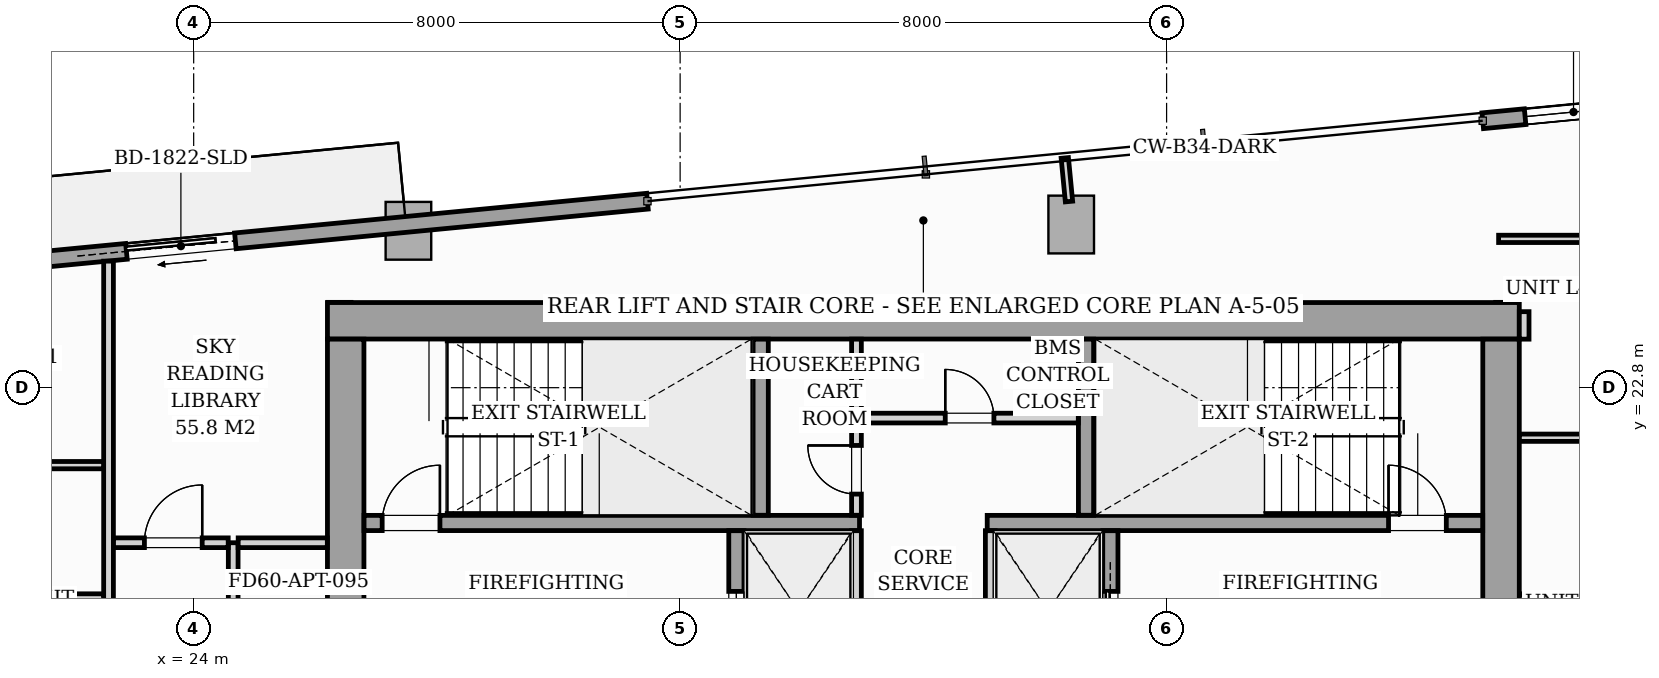
"""IFC4 building model, lengths in metres.
Left out: names, types, materials, properties, quantities, classifications, styles, units other than length and angle.
Written with IfcOpenShell. Run it as: python <this file> out.ifc"""

import sys

from ifc_helpers import new_model, si_unit, direction, frame, frame_2d, origin, origin_2d, place, context, subcontext, project, spatial, rectangle, i_section, extrude, source, transform, mapped, element, fill, save


model = new_model("IFC4")
c1 = context("Model", 3, precision=1e-05, world=origin(), true_north=direction((0.0, 1.0)))
c2 = subcontext(c1, "Body", "Model", "MODEL_VIEW")
j1 = project(units=[si_unit("LENGTHUNIT", "METRE"), si_unit("PLANEANGLEUNIT", "RADIAN")], contexts=[c1])
p1 = place(None, origin())
s1 = spatial("IfcSite", under=j1, at=p1, CompositionType="ELEMENT")
p2 = place(p1, origin())
s2 = spatial("IfcBuilding", under=s1, at=p2, CompositionType="ELEMENT")
p3 = place(p2, frame((0.0, 0.0, 173.0)))
s3 = spatial("IfcBuildingStorey", under=s2, at=p3, CompositionType="ELEMENT", Elevation=173.0)
m1 = source(origin(), c2, "Body", "SweptSolid", [
    extrude(i_section(OverallWidth=0.416, OverallDepth=0.446, WebThickness=0.039, FlangeThickness=0.063, FilletRadius=0.018, at=origin_2d()), origin(), (0.0, 0.0, 1.0), 3.196),
])
for number, where, z_axis, x_axis in (
    (1, (26.4, 24.0, 0.002), (0.0, 0.0, 1.0), (1.0, 0.0, 0.0)),
    (2, (33.12, 24.0, 0.002), (0.0, 0.0, 1.0), (1.0, 0.0, 0.0)),
    (3, (38.88, 24.0, 0.002), (0.0, 0.0, 1.0), (1.0, 0.0, 0.0)),
    (4, (45.6, 24.0, 0.002), (0.0, 0.0, 1.0), (1.0, 0.0, 0.0)),
):
    element("IfcColumn", number, at=place(p3, frame(where, z_axis=z_axis, x_axis=x_axis)), inside=s3, PredefinedType="PILASTER", context=c2, shape_type="MappedRepresentation", body=[
        mapped(m1, transform((0.0, 0.0, 0.0), scale=1.0)),
    ])
m2 = source(origin(), c2, "Body", "SweptSolid", [
    extrude(rectangle(XDim=0.75, YDim=0.95, at=origin_2d()), origin(), (0.0, 0.0, 1.0), 3.196),
])
for number, where, z_axis, x_axis in (
    (5, (27.532, 25.38, 0.002), (0.0, 0.0, 1.0), (0.995, 0.096, 0.0)),
    (6, (38.431, 25.483, 0.002), (0.0, 0.0, 1.0), (0.995, 0.096, 0.0)),
):
    element("IfcColumn", number, at=place(p3, frame(where, z_axis=z_axis, x_axis=x_axis)), inside=s3, PredefinedType="COLUMN", context=c2, shape_type="MappedRepresentation", body=[
        mapped(m2, transform((0.0, 0.0, 0.0), scale=1.0)),
    ])
p4 = place(p3, frame((15.437, 24.324, 0.0), z_axis=(0.0, 0.0, 1.0), x_axis=(0.995395627913, 0.095851676732, 0.0)))
e7 = element("IfcWall", 7, at=p4, inside=s3, PredefinedType="STANDARD", context=c2, shape_type="SweptSolid", body=[
    extrude(rectangle(XDim=16.1, YDim=0.26, at=frame_2d((8.05, 0.0))), origin(), (0.0, 0.0, 1.0), 2.94),
])
p5 = place(p4, frame((7.492, 0.0, 0.0)))
e8 = element("IfcOpeningElement", 8, at=p5, cuts=e7, PredefinedType="OPENING", context=c2, shape_type="SweptSolid", body=[
    extrude(rectangle(XDim=1.8, YDim=2.06, at=frame_2d((0.9, 1.03))), frame((0.0, 0.14, 0.0), z_axis=(0.0, -1.0, 0.0), x_axis=(1.0, 0.0, 0.0)), (0.0, 0.0, 1.0), 0.28),
])
p6 = place(p4, frame((2.05, 0.0, 0.65)))
e9 = element("IfcOpeningElement", 9, at=p6, cuts=e7, PredefinedType="OPENING", context=c2, shape_type="SweptSolid", body=[
    extrude(rectangle(XDim=1.6, YDim=1.5, at=frame_2d((0.8, 0.75))), frame((0.0, 0.14, 0.0), z_axis=(0.0, -1.0, 0.0), x_axis=(1.0, 0.0, 0.0)), (0.0, 0.0, 1.0), 0.28),
])
p7 = place(p3, frame((45.199, 27.19, 0.0), z_axis=(0.0, 0.0, 1.0), x_axis=(0.995397074604, 0.095836652014, 0.0)))
e10 = element("IfcWall", 10, at=p7, inside=s3, PredefinedType="STANDARD", context=c2, shape_type="SweptSolid", body=[
    extrude(rectangle(XDim=16.1, YDim=0.26, at=frame_2d((8.05, 0.0))), origin(), (0.0, 0.0, 1.0), 2.94),
])
p8 = place(p7, frame((10.2, 0.0, 0.0)))
e11 = element("IfcOpeningElement", 11, at=p8, cuts=e10, PredefinedType="OPENING", context=c2, shape_type="SweptSolid", body=[
    extrude(rectangle(XDim=1.8, YDim=2.06, at=frame_2d((0.9, 1.03))), frame((0.0, 0.14, 0.0), z_axis=(0.0, -1.0, 0.0), x_axis=(1.0, 0.0, 0.0)), (0.0, 0.0, 1.0), 0.28),
])
p9 = place(p7, frame((0.7, 0.0, 0.65)))
e12 = element("IfcOpeningElement", 12, at=p9, cuts=e10, PredefinedType="OPENING", context=c2, shape_type="SweptSolid", body=[
    extrude(rectangle(XDim=1.6, YDim=1.5, at=frame_2d((0.8, 0.75))), frame((0.0, 0.14, 0.0), z_axis=(0.0, -1.0, 0.0), x_axis=(1.0, 0.0, 0.0)), (0.0, 0.0, 1.0), 0.28),
])
p10 = place(p3, frame((26.2, 23.9, 0.0), z_axis=(0.0, 0.0, 1.0), x_axis=(1.0, 0.0, 0.0)))
e13 = element("IfcWall", 13, at=p10, inside=s3, PredefinedType="SHEAR", context=c2, shape_type="SweptSolid", body=[
    extrude(rectangle(XDim=19.6, YDim=0.6, at=frame_2d((9.8, 0.0))), origin(), (0.0, 0.0, 1.0), 3.2),
])
for number, where, z_axis, x_axis in (
    (14, (26.5, 17.802, 0.0), (0.0, 0.0, 1.0), (0.0, 1.0, 0.0)),
    (15, (45.5, 17.802, 0.0), (0.0, 0.0, 1.0), (0.0, 1.0, 0.0)),
):
    element("IfcWall", number, at=place(p3, frame(where, z_axis=z_axis, x_axis=x_axis)), inside=s3, PredefinedType="SHEAR", context=c2, shape_type="SweptSolid", body=[
        extrude(rectangle(XDim=5.796, YDim=0.6, at=frame_2d((2.898, 0.0))), origin(), (0.0, 0.0, 1.0), 3.2),
    ])
p11 = place(p3, frame((26.802, 20.575, 0.0), z_axis=(0.0, 0.0, 1.0), x_axis=(1.0, 0.0, 0.0)))
e16 = element("IfcWall", 16, at=p11, inside=s3, PredefinedType="SOLIDWALL", context=c2, shape_type="SweptSolid", body=[
    extrude(rectangle(XDim=8.148, YDim=0.25, at=frame_2d((4.074, 0.0))), origin(), (0.0, 0.0, 1.0), 3.2),
])
p12 = place(p11, frame((0.298, 0.0, 0.0)))
e17 = element("IfcOpeningElement", 17, at=p12, cuts=e16, PredefinedType="OPENING", context=c2, shape_type="SweptSolid", body=[
    extrude(rectangle(XDim=0.95, YDim=2.06, at=frame_2d((0.475, 1.03))), frame((0.0, 0.135, 0.0), z_axis=(0.0, -1.0, 0.0), x_axis=(1.0, 0.0, 0.0)), (0.0, 0.0, 1.0), 0.27),
])
p13 = place(p3, frame((37.05, 20.575, 0.0), z_axis=(0.0, 0.0, 1.0), x_axis=(1.0, 0.0, 0.0)))
e18 = element("IfcWall", 18, at=p13, inside=s3, PredefinedType="SOLIDWALL", context=c2, shape_type="SweptSolid", body=[
    extrude(rectangle(XDim=8.148, YDim=0.25, at=frame_2d((4.074, 0.0))), origin(), (0.0, 0.0, 1.0), 3.2),
])
p14 = place(p13, frame((6.6, 0.0, 0.0)))
e19 = element("IfcOpeningElement", 19, at=p14, cuts=e18, PredefinedType="OPENING", context=c2, shape_type="SweptSolid", body=[
    extrude(rectangle(XDim=0.95, YDim=2.06, at=frame_2d((0.475, 1.03))), frame((0.0, 0.135, 0.0), z_axis=(0.0, -1.0, 0.0), x_axis=(1.0, 0.0, 0.0)), (0.0, 0.0, 1.0), 0.27),
])
for number, where, z_axis, x_axis in (
    (20, (33.325, 20.702, 0.0), (0.0, 0.0, 1.0), (0.0, 1.0, 0.0)),
    (21, (38.675, 20.702, 0.0), (0.0, 0.0, 1.0), (0.0, 1.0, 0.0)),
):
    element("IfcWall", number, at=place(p3, frame(where, z_axis=z_axis, x_axis=x_axis)), inside=s3, PredefinedType="SOLIDWALL", context=c2, shape_type="SweptSolid", body=[
        extrude(rectangle(XDim=2.896, YDim=0.25, at=frame_2d((1.448, 0.0))), origin(), (0.0, 0.0, 1.0), 3.2),
    ])
p15 = place(p3, frame((32.925, 17.802, 0.0), z_axis=(0.0, 0.0, 1.0), x_axis=(0.0, 1.0, 0.0)))
e22 = element("IfcWall", 22, at=p15, inside=s3, PredefinedType="SOLIDWALL", context=c2, shape_type="SweptSolid", body=[
    extrude(rectangle(XDim=2.646, YDim=0.25, at=frame_2d((1.323, 0.0))), origin(), (0.0, 0.0, 1.0), 3.2),
])
p16 = place(p15, frame((0.548, 0.0, 0.0)))
e23 = element("IfcOpeningElement", 23, at=p16, cuts=e22, PredefinedType="OPENING", context=c2, shape_type="SweptSolid", body=[
    extrude(rectangle(XDim=1.1, YDim=2.08, at=frame_2d((0.55, 1.04))), frame((0.0, 0.135, 0.0), z_axis=(0.0, -1.0, 0.0), x_axis=(1.0, 0.0, 0.0)), (0.0, 0.0, 1.0), 0.27),
])
for number, where, z_axis, x_axis in (
    (24, (34.9, 17.802, 0.0), (0.0, 0.0, 1.0), (0.0, 1.0, 0.0)),
    (25, (37.1, 17.802, 0.0), (0.0, 0.0, 1.0), (0.0, 1.0, 0.0)),
):
    element("IfcWall", number, at=place(p3, frame(where, z_axis=z_axis, x_axis=x_axis)), inside=s3, PredefinedType="PARTITIONING", context=c2, shape_type="SweptSolid", body=[
        extrude(rectangle(XDim=2.646, YDim=0.16, at=frame_2d((1.323, 0.0))), origin(), (0.0, 0.0, 1.0), 2.94),
    ])
p17 = place(p3, frame((39.075, 17.802, 0.0), z_axis=(0.0, 0.0, 1.0), x_axis=(0.0, 1.0, 0.0)))
e26 = element("IfcWall", 26, at=p17, inside=s3, PredefinedType="SOLIDWALL", context=c2, shape_type="SweptSolid", body=[
    extrude(rectangle(XDim=2.646, YDim=0.25, at=frame_2d((1.323, 0.0))), origin(), (0.0, 0.0, 1.0), 3.2),
])
p18 = place(p17, frame((0.548, 0.0, 0.0)))
e27 = element("IfcOpeningElement", 27, at=p18, cuts=e26, PredefinedType="OPENING", context=c2, shape_type="SweptSolid", body=[
    extrude(rectangle(XDim=1.1, YDim=2.08, at=frame_2d((0.55, 1.04))), frame((0.0, 0.135, 0.0), z_axis=(0.0, -1.0, 0.0), x_axis=(1.0, 0.0, 0.0)), (0.0, 0.0, 1.0), 0.27),
])
p19 = place(p3, frame((34.9, 20.702, 0.0), z_axis=(0.0, 0.0, 1.0), x_axis=(0.0, 1.0, 0.0)))
e28 = element("IfcWall", 28, at=p19, inside=s3, PredefinedType="PARTITIONING", context=c2, shape_type="SweptSolid", body=[
    extrude(rectangle(XDim=2.896, YDim=0.16, at=frame_2d((1.448, 0.0))), origin(), (0.0, 0.0, 1.0), 2.94),
])
p20 = place(p19, frame((0.348, 0.0, 0.0)))
e29 = element("IfcOpeningElement", 29, at=p20, cuts=e28, PredefinedType="OPENING", context=c2, shape_type="SweptSolid", body=[
    extrude(rectangle(XDim=0.8, YDim=2.05, at=frame_2d((0.4, 1.025))), frame((0.0, 0.09, 0.0), z_axis=(0.0, -1.0, 0.0), x_axis=(1.0, 0.0, 0.0)), (0.0, 0.0, 1.0), 0.18),
])
p21 = place(p3, frame((34.982, 22.3, 0.0), z_axis=(0.0, 0.0, 1.0), x_axis=(1.0, 0.0, 0.0)))
e30 = element("IfcWall", 30, at=p21, inside=s3, PredefinedType="PARTITIONING", context=c2, shape_type="SweptSolid", body=[
    extrude(rectangle(XDim=3.566, YDim=0.16, at=frame_2d((1.783, 0.0))), origin(), (0.0, 0.0, 1.0), 2.94),
])
p22 = place(p21, frame((1.378, 0.0, 0.0)))
e31 = element("IfcOpeningElement", 31, at=p22, cuts=e30, PredefinedType="OPENING", context=c2, shape_type="SweptSolid", body=[
    extrude(rectangle(XDim=0.8, YDim=2.05, at=frame_2d((0.4, 1.025))), frame((0.0, 0.09, 0.0), z_axis=(0.0, -1.0, 0.0), x_axis=(1.0, 0.0, 0.0)), (0.0, 0.0, 1.0), 0.18),
])
p23 = place(p3, frame((22.6, 13.232, 0.0), z_axis=(0.0, 0.0, 1.0), x_axis=(0.0, 1.0, 0.0)))
e32 = element("IfcWall", 32, at=p23, inside=s3, PredefinedType="PARTITIONING", context=c2, shape_type="SweptSolid", body=[
    extrude(rectangle(XDim=11.649, YDim=0.16, at=frame_2d((5.824, 0.0))), origin(), (0.0, 0.0, 1.0), 2.94),
])
p24 = place(p23, frame((0.493, 0.0, 0.0)))
e33 = element("IfcOpeningElement", 33, at=p24, cuts=e32, PredefinedType="OPENING", context=c2, shape_type="SweptSolid", body=[
    extrude(rectangle(XDim=0.95, YDim=2.06, at=frame_2d((0.475, 1.03))), frame((0.0, 0.09, 0.0), z_axis=(0.0, -1.0, 0.0), x_axis=(1.0, 0.0, 0.0)), (0.0, 0.0, 1.0), 0.18),
])
p25 = place(p3, frame((45.88, 23.598, 0.0), z_axis=(0.0, 0.0, 1.0), x_axis=(0.0, 1.0, 0.0)))
e34 = element("IfcWall", 34, at=p25, inside=s3, PredefinedType="PARTITIONING", context=c2, shape_type="SweptSolid", body=[
    extrude(rectangle(XDim=0.452, YDim=0.16, at=frame_2d((0.226, 0.0))), origin(), (0.0, 0.0, 1.0), 2.94),
])
p26 = place(p3, frame((20.262, 19.35, 0.0), z_axis=(0.0, 0.0, 1.0), x_axis=(1.0, 0.0, 0.0)))
e35 = element("IfcWall", 35, at=p26, inside=s3, PredefinedType="PARTITIONING", context=c2, shape_type="SweptSolid", body=[
    extrude(rectangle(XDim=2.256, YDim=0.12, at=frame_2d((1.128, 0.0))), origin(), (0.0, 0.0, 1.0), 2.94),
])
p27 = place(p3, frame((14.53, 21.526, 0.0), z_axis=(0.0, 0.0, 1.0), x_axis=(1.0, 0.0, 0.0)))
e36 = element("IfcWall", 36, at=p27, inside=s3, PredefinedType="PARTITIONING", context=c2, shape_type="SweptSolid", body=[
    extrude(rectangle(XDim=7.988, YDim=0.12, at=frame_2d((3.994, 0.0))), origin(), (0.0, 0.0, 1.0), 2.94),
])
p28 = place(p27, frame((2.925, 0.0, 0.0)))
e37 = element("IfcOpeningElement", 37, at=p28, cuts=e36, PredefinedType="OPENING", context=c2, shape_type="SweptSolid", body=[
    extrude(rectangle(XDim=0.85, YDim=2.05, at=frame_2d((0.425, 1.025))), frame((0.0, 0.07, 0.0), z_axis=(0.0, -1.0, 0.0), x_axis=(1.0, 0.0, 0.0)), (0.0, 0.0, 1.0), 0.14),
])
p29 = place(p3, frame((45.802, 19.35, 0.0), z_axis=(0.0, 0.0, 1.0), x_axis=(1.0, 0.0, 0.0)))
e38 = element("IfcWall", 38, at=p29, inside=s3, PredefinedType="PARTITIONING", context=c2, shape_type="SweptSolid", body=[
    extrude(rectangle(XDim=2.416, YDim=0.12, at=frame_2d((1.208, 0.0))), origin(), (0.0, 0.0, 1.0), 2.94),
])
p30 = place(p3, frame((45.46, 25.247, 0.0), z_axis=(0.0, 0.0, 1.0), x_axis=(1.0, 0.0, 0.0)))
e39 = element("IfcWall", 39, at=p30, inside=s3, PredefinedType="PARTITIONING", context=c2, shape_type="SweptSolid", body=[
    extrude(rectangle(XDim=9.461, YDim=0.12, at=frame_2d((4.73, 0.0))), origin(), (0.0, 0.0, 1.0), 2.94),
])
p31 = place(p30, frame((4.826, 0.0, 0.0)))
e40 = element("IfcOpeningElement", 40, at=p31, cuts=e39, PredefinedType="OPENING", context=c2, shape_type="SweptSolid", body=[
    extrude(rectangle(XDim=0.85, YDim=2.05, at=frame_2d((0.425, 1.025))), frame((0.0, 0.07, 0.0), z_axis=(0.0, -1.0, 0.0), x_axis=(1.0, 0.0, 0.0)), (0.0, 0.0, 1.0), 0.14),
])
p32 = place(p3, frame((45.802, 21.977, 0.0), z_axis=(0.0, 0.0, 1.0), x_axis=(1.0, 0.0, 0.0)))
e41 = element("IfcWall", 41, at=p32, inside=s3, PredefinedType="PARTITIONING", context=c2, shape_type="SweptSolid", body=[
    extrude(rectangle(XDim=18.504, YDim=0.12, at=frame_2d((9.252, 0.0))), origin(), (0.0, 0.0, 1.0), 2.94),
])
p33 = place(p32, frame((8.913, 0.0, 0.0)))
e42 = element("IfcOpeningElement", 42, at=p33, cuts=e41, PredefinedType="OPENING", context=c2, shape_type="SweptSolid", body=[
    extrude(rectangle(XDim=0.85, YDim=2.05, at=frame_2d((0.425, 1.025))), frame((0.0, 0.07, 0.0), z_axis=(0.0, -1.0, 0.0), x_axis=(1.0, 0.0, 0.0)), (0.0, 0.0, 1.0), 0.14),
])
p34 = place(p3, frame((24.65, 14.66, 0.0), z_axis=(0.0, 0.0, 1.0), x_axis=(0.0, 1.0, 0.0)))
e43 = element("IfcWall", 43, at=p34, inside=s3, PredefinedType="PARTITIONING", context=c2, shape_type="SweptSolid", body=[
    extrude(rectangle(XDim=5.59, YDim=0.16, at=frame_2d((2.795, 0.0))), origin(), (0.0, 0.0, 1.0), 2.94),
])
p35 = place(p34, frame((3.54, 0.0, 0.0)))
e44 = element("IfcOpeningElement", 44, at=p35, cuts=e43, PredefinedType="OPENING", context=c2, shape_type="SweptSolid", body=[
    extrude(rectangle(XDim=0.95, YDim=2.06, at=frame_2d((0.475, 1.03))), frame((0.0, 0.09, 0.0), z_axis=(0.0, -1.0, 0.0), x_axis=(1.0, 0.0, 0.0)), (0.0, 0.0, 1.0), 0.18),
])
p36 = place(p3, frame((22.682, 20.25, 0.0), z_axis=(0.0, 0.0, 1.0), x_axis=(1.0, 0.0, 0.0)))
e45 = element("IfcWall", 45, at=p36, inside=s3, PredefinedType="PARTITIONING", context=c2, shape_type="SweptSolid", body=[
    extrude(rectangle(XDim=1.886, YDim=0.16, at=frame_2d((0.943, 0.0))), origin(), (0.0, 0.0, 1.0), 2.94),
])
p37 = place(p36, frame((0.508, 0.0, 0.0)))
e46 = element("IfcOpeningElement", 46, at=p37, cuts=e45, PredefinedType="OPENING", context=c2, shape_type="SweptSolid", body=[
    extrude(rectangle(XDim=0.95, YDim=2.06, at=frame_2d((0.475, 1.03))), frame((0.0, 0.09, 0.0), z_axis=(0.0, -1.0, 0.0), x_axis=(1.0, 0.0, 0.0)), (0.0, 0.0, 1.0), 0.18),
])
p38 = place(p3, frame((24.732, 20.25, 0.0), z_axis=(0.0, 0.0, 1.0), x_axis=(1.0, 0.0, 0.0)))
e47 = element("IfcWall", 47, at=p38, inside=s3, PredefinedType="PARTITIONING", context=c2, shape_type="SweptSolid", body=[
    extrude(rectangle(XDim=1.466, YDim=0.16, at=frame_2d((0.733, 0.0))), origin(), (0.0, 0.0, 1.0), 2.94),
])
p39 = place(p3, frame((38.395, 25.861, 0.0), z_axis=(0.0, 0.0, 1.0), x_axis=(-0.095977354523, 0.995383517755, 0.0)))
e48 = element("IfcWall", 48, at=p39, inside=s3, PredefinedType="PARTITIONING", context=c2, shape_type="SweptSolid", body=[
    extrude(rectangle(XDim=0.72, YDim=0.12, at=frame_2d((0.36, 0.0))), origin(), (0.0, 0.0, 1.0), 2.94),
])
m3 = source(origin(), c2, "Body", "SweptSolid", [
    extrude(rectangle(XDim=1.8, YDim=2.06, at=frame_2d((0.9, 1.03))), frame((0.0, 0.025, 0.0), z_axis=(0.0, -1.0, 0.0), x_axis=(1.0, 0.0, 0.0)), (0.0, 0.0, 1.0), 0.05),
])
p40 = place(p5, origin())
e49 = element("IfcDoor", 49, at=p40, inside=s3, OperationType="SLIDING_TO_LEFT", PredefinedType="DOOR", context=c2, shape_type="MappedRepresentation", body=[
    mapped(m3, transform((0.0, 0.0, 0.0), scale=1.0)),
])
fill(e8, e49)
m4 = source(origin(), c2, "Body", "SweptSolid", [
    extrude(rectangle(XDim=1.6, YDim=1.5, at=frame_2d((0.8, 0.75))), frame((0.0, 0.03, 0.0), z_axis=(0.0, -1.0, 0.0), x_axis=(1.0, 0.0, 0.0)), (0.0, 0.0, 1.0), 0.06),
])
p41 = place(p9, origin())
e50 = element("IfcWindow", 50, at=p41, inside=s3, PartitioningType="SINGLE_PANEL", PredefinedType="WINDOW", context=c2, shape_type="MappedRepresentation", body=[
    mapped(m4, transform((0.0, 0.0, 0.0), scale=1.0)),
])
fill(e12, e50)
m5 = source(origin(), c2, "Body", "SweptSolid", [
    extrude(rectangle(XDim=0.95, YDim=2.06, at=frame_2d((0.475, 1.03))), frame((0.0, 0.025, 0.0), z_axis=(0.0, -1.0, 0.0), x_axis=(1.0, 0.0, 0.0)), (0.0, 0.0, 1.0), 0.05),
])
p42 = place(p12, origin())
e51 = element("IfcDoor", 51, at=p42, inside=s3, OperationType="SINGLE_SWING_RIGHT", PredefinedType="DOOR", context=c2, shape_type="MappedRepresentation", body=[
    mapped(m5, transform((0.0, 0.0, 0.0), scale=1.0)),
])
fill(e17, e51)
p43 = place(p14, origin())
e52 = element("IfcDoor", 52, at=p43, inside=s3, OperationType="SINGLE_SWING_LEFT", PredefinedType="DOOR", context=c2, shape_type="MappedRepresentation", body=[
    mapped(m5, transform((0.0, 0.0, 0.0), scale=1.0)),
])
fill(e19, e52)
m6 = source(origin(), c2, "Body", "SweptSolid", [
    extrude(rectangle(XDim=1.1, YDim=2.08, at=frame_2d((0.55, 1.04))), frame((0.0, 0.025, 0.0), z_axis=(0.0, -1.0, 0.0), x_axis=(1.0, 0.0, 0.0)), (0.0, 0.0, 1.0), 0.05),
])
p44 = place(p16, origin())
e53 = element("IfcDoor", 53, at=p44, inside=s3, OperationType="SLIDING_TO_LEFT", PredefinedType="DOOR", context=c2, shape_type="MappedRepresentation", body=[
    mapped(m6, transform((0.0, 0.0, 0.0), scale=1.0)),
])
fill(e23, e53)
p45 = place(p18, origin())
e54 = element("IfcDoor", 54, at=p45, inside=s3, OperationType="SLIDING_TO_RIGHT", PredefinedType="DOOR", context=c2, shape_type="MappedRepresentation", body=[
    mapped(m6, transform((0.0, 0.0, 0.0), scale=1.0)),
])
fill(e27, e54)
m7 = source(origin(), c2, "Body", "SweptSolid", [
    extrude(rectangle(XDim=0.8, YDim=2.05, at=frame_2d((0.4, 1.025))), frame((0.0, 0.025, 0.0), z_axis=(0.0, -1.0, 0.0), x_axis=(1.0, 0.0, 0.0)), (0.0, 0.0, 1.0), 0.05),
])
p46 = place(p20, origin())
e55 = element("IfcDoor", 55, at=p46, inside=s3, OperationType="SINGLE_SWING_RIGHT", PredefinedType="DOOR", context=c2, shape_type="MappedRepresentation", body=[
    mapped(m7, transform((0.0, 0.0, 0.0), scale=1.0)),
])
fill(e29, e55)
p47 = place(p22, origin())
e56 = element("IfcDoor", 56, at=p47, inside=s3, OperationType="SINGLE_SWING_LEFT", PredefinedType="DOOR", context=c2, shape_type="MappedRepresentation", body=[
    mapped(m7, transform((0.0, 0.0, 0.0), scale=1.0)),
])
fill(e31, e56)
m8 = source(origin(), c2, "Body", "SweptSolid", [
    extrude(rectangle(XDim=0.95, YDim=2.06, at=frame_2d((0.475, 1.03))), frame((0.0, 0.025, 0.0), z_axis=(0.0, -1.0, 0.0), x_axis=(1.0, 0.0, 0.0)), (0.0, 0.0, 1.0), 0.05),
])
p48 = place(p37, origin())
e57 = element("IfcDoor", 57, at=p48, inside=s3, OperationType="SINGLE_SWING_RIGHT", PredefinedType="DOOR", context=c2, shape_type="MappedRepresentation", body=[
    mapped(m8, transform((0.0, 0.0, 0.0), scale=1.0)),
])
fill(e46, e57)
save(model, sys.argv[1])
